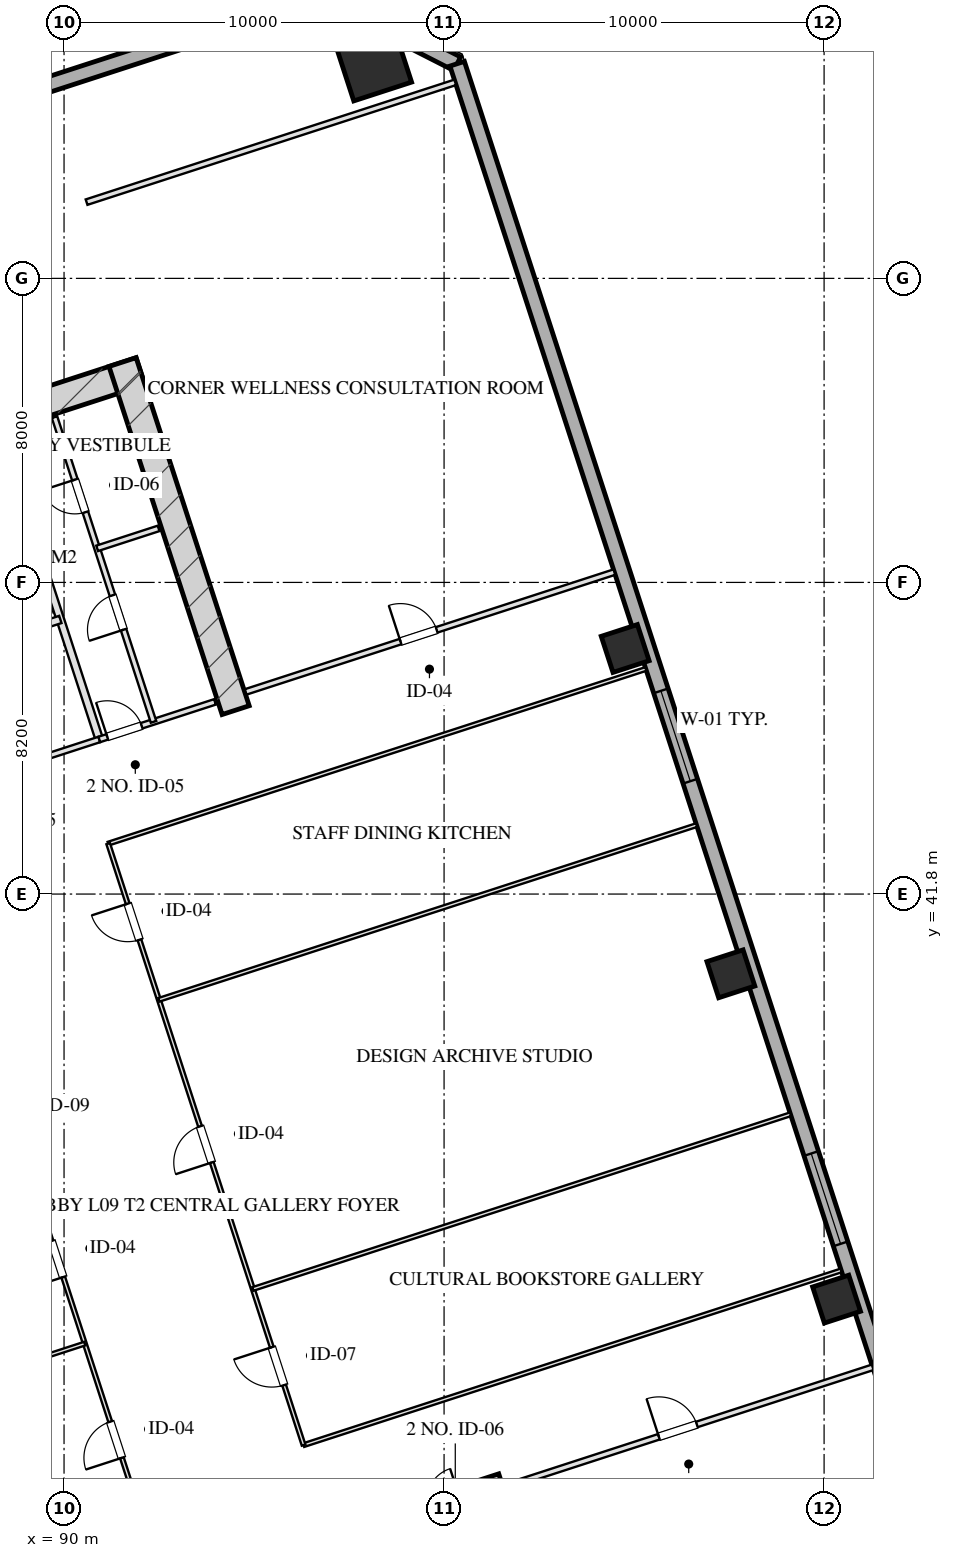
"""IFC4 building model, lengths in metres.
Left out: names, types, materials, properties, quantities, classifications, styles, units other than length and angle.
Written with IfcOpenShell. Run it as: python <this file> out.ifc"""

import sys

from ifc_helpers import new_model, si_unit, direction, frame, frame_2d, origin, origin_2d, place, context, subcontext, project, spatial, rectangle, hollow_rectangle, extrude, element, fill, save


model = new_model("IFC4")
c1 = context("Model", 3, precision=1e-05, world=origin(), true_north=direction((0.0, 1.0)))
c2 = subcontext(c1, "Body", "Model", "MODEL_VIEW")
j1 = project(units=[si_unit("LENGTHUNIT", "METRE"), si_unit("PLANEANGLEUNIT", "RADIAN")], contexts=[c1])
p1 = place(None, origin())
s1 = spatial("IfcSite", under=j1, at=p1, CompositionType="ELEMENT")
p2 = place(p1, origin())
s2 = spatial("IfcBuilding", under=s1, at=p2, CompositionType="ELEMENT")
p3 = place(p2, frame((0.0, 0.0, 42.0)))
s3 = spatial("IfcBuildingStorey", under=s2, at=p3, CompositionType="ELEMENT", Elevation=42.0)
p4 = place(p3, frame((101.082, 26.429, 0.0), z_axis=(0.0, 0.0, 1.0), x_axis=(0.309016134813, -0.951056795583, 0.0)))
e1 = element("IfcWall", 1, at=p4, inside=s3, PredefinedType="SHEAR", context=c2, shape_type="SweptSolid", body=[
    extrude(rectangle(XDim=9.63, YDim=0.75, at=frame_2d((4.815, 0.0))), origin(), (0.0, 0.0, 1.0), 4.0),
])
p5 = place(p3, frame((76.272, 50.443, 0.0), z_axis=(0.0, 0.0, 1.0), x_axis=(0.951056072937, 0.309018358888, 0.0)))
e2 = element("IfcWall", 2, at=p5, inside=s3, PredefinedType="SHEAR", context=c2, shape_type="SweptSolid", body=[
    extrude(rectangle(XDim=16.55, YDim=0.75, at=frame_2d((8.275, 0.0))), origin(), (0.0, 0.0, 1.0), 4.0),
])
p6 = place(p3, frame((94.515, 46.639, 0.0), z_axis=(0.0, 0.0, 1.0), x_axis=(-0.309016134813, 0.951056795583, 0.0)))
e3 = element("IfcWall", 3, at=p6, inside=s3, PredefinedType="SHEAR", context=c2, shape_type="SweptSolid", body=[
    extrude(rectangle(XDim=9.63, YDim=0.75, at=frame_2d((4.815, 0.0))), origin(), (0.0, 0.0, 1.0), 4.0),
])
p7 = place(p3, frame((98.137, 63.677, 0.0), z_axis=(0.0, 0.0, 1.0), x_axis=(0.951056516295, 0.309016994375, 0.0)))
e4 = element("IfcColumn", 4, at=p7, inside=s3, PredefinedType="COLUMN", context=c2, shape_type="SweptSolid", body=[
    extrude(hollow_rectangle(XDim=1.6, YDim=1.6, WallThickness=0.055, at=origin_2d()), origin(), (0.0, 0.0, 1.0), 4.001),
])
for number, where, z_axis, x_axis in (
    (5, (110.328, 31.142, 0.0), (0.0, 0.0, 1.0), (0.951, 0.309, 0.0)),
    (6, (107.547, 39.701, 0.0), (0.0, 0.0, 1.0), (0.951, 0.309, 0.0)),
    (7, (104.766, 48.261, 0.0), (0.0, 0.0, 1.0), (0.951, 0.309, 0.0)),
):
    element("IfcColumn", number, at=place(p3, frame(where, z_axis=z_axis, x_axis=x_axis)), inside=s3, PredefinedType="COLUMN", context=c2, shape_type="SweptSolid", body=[
        extrude(hollow_rectangle(XDim=1.0, YDim=1.0, WallThickness=0.036, at=origin_2d()), origin(), (0.0, 0.0, 1.0), 4.001),
    ])
p8 = place(p3, frame((66.002, 55.433, 0.0), z_axis=(0.0, 0.0, 1.0), x_axis=(0.951055939317, 0.309018770125, 0.0)))
e8 = element("IfcWall", 8, at=p8, inside=s3, PredefinedType="SOLIDWALL", context=c2, shape_type="SweptSolid", body=[
    extrude(rectangle(XDim=32.4, YDim=0.4, at=frame_2d((16.2, 0.0))), origin(), (0.0, 0.0, 1.0), 3.1),
])
p9 = place(p3, frame((96.816, 65.446, 0.0), z_axis=(0.0, 0.0, 1.0), x_axis=(0.890998089617, -0.454007053137, 0.0)))
e9 = element("IfcWall", 9, at=p9, inside=s3, PredefinedType="SOLIDWALL", context=c2, shape_type="SweptSolid", body=[
    extrude(rectangle(XDim=3.96, YDim=0.4, at=frame_2d((1.98, 0.0))), origin(), (0.0, 0.0, 1.0), 3.1),
])
p10 = place(p3, frame((100.345, 63.648, 0.0), z_axis=(0.0, 0.0, 1.0), x_axis=(0.309014526607, -0.951057318118, 0.0)))
e10 = element("IfcWall", 10, at=p10, inside=s3, PredefinedType="SOLIDWALL", context=c2, shape_type="SweptSolid", body=[
    extrude(rectangle(XDim=50.0, YDim=0.4, at=frame_2d((25.0, 0.0))), origin(), (0.0, 0.0, 1.0), 3.1),
])
p11 = place(p10, frame((30.15, 0.0, 0.75)))
e11 = element("IfcOpeningElement", 11, at=p11, cuts=e10, PredefinedType="OPENING", context=c2, shape_type="SweptSolid", body=[
    extrude(rectangle(XDim=2.5, YDim=1.75, at=frame_2d((1.25, 0.875))), frame((0.0, 0.21, 0.0), z_axis=(0.0, -1.0, 0.0), x_axis=(1.0, 0.0, 0.0)), (0.0, 0.0, 1.0), 0.42),
])
p12 = place(p10, frame((17.35, 0.0, 0.75)))
e12 = element("IfcOpeningElement", 12, at=p12, cuts=e10, PredefinedType="OPENING", context=c2, shape_type="SweptSolid", body=[
    extrude(rectangle(XDim=2.5, YDim=1.75, at=frame_2d((1.25, 0.875))), frame((0.0, 0.21, 0.0), z_axis=(0.0, -1.0, 0.0), x_axis=(1.0, 0.0, 0.0)), (0.0, 0.0, 1.0), 0.42),
])
p13 = place(p3, frame((90.928, 45.868, 0.0), z_axis=(0.0, 0.0, 1.0), x_axis=(-0.309042196757, 0.951048327176, 0.0)))
e13 = element("IfcWall", 13, at=p13, inside=s3, PredefinedType="PARTITIONING", context=c2, shape_type="SweptSolid", body=[
    extrude(rectangle(XDim=8.43, YDim=0.2, at=frame_2d((4.215, 0.0))), origin(), (0.0, 0.0, 1.0), 3.705),
])
p14 = place(p3, frame((86.743, 44.508, 0.0), z_axis=(0.0, 0.0, 1.0), x_axis=(0.951063829732, 0.308994485023, 0.0)))
e14 = element("IfcWall", 14, at=p14, inside=s3, PredefinedType="PARTITIONING", context=c2, shape_type="SweptSolid", body=[
    extrude(rectangle(XDim=4.4, YDim=0.15, at=frame_2d((2.2, 0.0))), origin(), (0.0, 0.0, 1.0), 3.705),
])
p15 = place(p14, frame((1.45, 0.0, 0.0)))
e15 = element("IfcOpeningElement", 15, at=p15, cuts=e14, PredefinedType="OPENING", context=c2, shape_type="SweptSolid", body=[
    extrude(rectangle(XDim=1.5, YDim=2.05, at=frame_2d((0.75, 1.025))), frame((0.0, 0.085, 0.0), z_axis=(0.0, -1.0, 0.0), x_axis=(1.0, 0.0, 0.0)), (0.0, 0.0, 1.0), 0.17),
])
p16 = place(p3, frame((85.718, 47.666, 0.0), z_axis=(0.0, 0.0, 1.0), x_axis=(0.951058531764, 0.30901079133, 0.0)))
e16 = element("IfcWall", 16, at=p16, inside=s3, PredefinedType="PARTITIONING", context=c2, shape_type="SweptSolid", body=[
    extrude(rectangle(XDim=4.4, YDim=0.2, at=frame_2d((2.2, 0.0))), origin(), (0.0, 0.0, 1.0), 3.705),
])
p17 = place(p16, frame((0.45, 0.0, 0.0)))
e17 = element("IfcOpeningElement", 17, at=p17, cuts=e16, PredefinedType="OPENING", context=c2, shape_type="SweptSolid", body=[
    extrude(rectangle(XDim=1.1, YDim=2.05, at=frame_2d((0.55, 1.025))), frame((0.0, 0.11, 0.0), z_axis=(0.0, -1.0, 0.0), x_axis=(1.0, 0.0, 0.0)), (0.0, 0.0, 1.0), 0.22),
])
p18 = place(p16, frame((2.55, 0.0, 0.0)))
e18 = element("IfcOpeningElement", 18, at=p18, cuts=e16, PredefinedType="OPENING", context=c2, shape_type="SweptSolid", body=[
    extrude(rectangle(XDim=1.1, YDim=2.05, at=frame_2d((0.55, 1.025))), frame((0.0, 0.11, 0.0), z_axis=(0.0, -1.0, 0.0), x_axis=(1.0, 0.0, 0.0)), (0.0, 0.0, 1.0), 0.22),
])
p19 = place(p3, frame((90.928, 45.868, 0.0), z_axis=(0.0, 0.0, 1.0), x_axis=(0.951059297078, 0.309008435874, 0.0)))
e19 = element("IfcWall", 19, at=p19, inside=s3, PredefinedType="PARTITIONING", context=c2, shape_type="SweptSolid", body=[
    extrude(rectangle(XDim=3.2, YDim=0.15, at=frame_2d((1.6, 0.0))), origin(), (0.0, 0.0, 1.0), 3.705),
])
p20 = place(p19, frame((0.22, 0.0, 0.0)))
e20 = element("IfcOpeningElement", 20, at=p20, cuts=e19, PredefinedType="OPENING", context=c2, shape_type="SweptSolid", body=[
    extrude(rectangle(XDim=0.95, YDim=2.05, at=frame_2d((0.475, 1.025))), frame((0.0, 0.085, 0.0), z_axis=(0.0, -1.0, 0.0), x_axis=(1.0, 0.0, 0.0)), (0.0, 0.0, 1.0), 0.17),
])
p21 = place(p3, frame((92.355, 46.331, 0.0), z_axis=(0.0, 0.0, 1.0), x_axis=(-0.309007490203, 0.951059604335, 0.0)))
e21 = element("IfcWall", 21, at=p21, inside=s3, PredefinedType="PARTITIONING", context=c2, shape_type="SweptSolid", body=[
    extrude(rectangle(XDim=8.43, YDim=0.15, at=frame_2d((4.215, 0.0))), origin(), (0.0, 0.0, 1.0), 3.705),
])
p22 = place(p21, frame((2.55, 0.0, 0.0)))
e22 = element("IfcOpeningElement", 22, at=p22, cuts=e21, PredefinedType="OPENING", context=c2, shape_type="SweptSolid", body=[
    extrude(rectangle(XDim=0.95, YDim=2.05, at=frame_2d((0.475, 1.025))), frame((0.0, 0.085, 0.0), z_axis=(0.0, -1.0, 0.0), x_axis=(1.0, 0.0, 0.0)), (0.0, 0.0, 1.0), 0.17),
])
p23 = place(p21, frame((5.8, 0.0, 0.0)))
e23 = element("IfcOpeningElement", 23, at=p23, cuts=e21, PredefinedType="OPENING", context=c2, shape_type="SweptSolid", body=[
    extrude(rectangle(XDim=0.9, YDim=2.05, at=frame_2d((0.45, 1.025))), frame((0.0, 0.085, 0.0), z_axis=(0.0, -1.0, 0.0), x_axis=(1.0, 0.0, 0.0)), (0.0, 0.0, 1.0), 0.17),
])
p24 = place(p3, frame((90.871, 50.896, 0.0), z_axis=(0.0, 0.0, 1.0), x_axis=(0.951054116971, 0.309024378638, 0.0)))
e24 = element("IfcWall", 24, at=p24, inside=s3, PredefinedType="PARTITIONING", context=c2, shape_type="SweptSolid", body=[
    extrude(rectangle(XDim=1.7, YDim=0.15, at=frame_2d((0.85, 0.0))), origin(), (0.0, 0.0, 1.0), 3.705),
])
p25 = place(p3, frame((101.578, 26.196, 0.0), z_axis=(0.0, 0.0, 1.0), x_axis=(0.951059043131, 0.309009217467, 0.0)))
e25 = element("IfcWall", 25, at=p25, inside=s3, PredefinedType="PARTITIONING", context=c2, shape_type="SweptSolid", body=[
    extrude(rectangle(XDim=10.2, YDim=0.15, at=frame_2d((5.1, 0.0))), origin(), (0.0, 0.0, 1.0), 3.705),
])
p26 = place(p25, frame((4.284, 0.0, 0.0)))
e26 = element("IfcOpeningElement", 26, at=p26, cuts=e25, PredefinedType="OPENING", context=c2, shape_type="SweptSolid", body=[
    extrude(rectangle(XDim=1.05, YDim=2.05, at=frame_2d((0.525, 1.025))), frame((0.0, 0.085, 0.0), z_axis=(0.0, -1.0, 0.0), x_axis=(1.0, 0.0, 0.0)), (0.0, 0.0, 1.0), 0.17),
])
p27 = place(p3, frame((90.593, 60.006, 0.0), z_axis=(0.0, 0.0, 1.0), x_axis=(0.951059043131, 0.309009217467, 0.0)))
e27 = element("IfcWall", 27, at=p27, inside=s3, PredefinedType="PARTITIONING", context=c2, shape_type="SweptSolid", body=[
    extrude(rectangle(XDim=10.2, YDim=0.15, at=frame_2d((5.1, 0.0))), origin(), (0.0, 0.0, 1.0), 3.705),
])
p28 = place(p3, frame((94.78, 47.119, 0.0), z_axis=(0.0, 0.0, 1.0), x_axis=(0.951054294345, 0.309023832749, 0.0)))
e28 = element("IfcWall", 28, at=p28, inside=s3, PredefinedType="PARTITIONING", context=c2, shape_type="SweptSolid", body=[
    extrude(rectangle(XDim=10.2, YDim=0.15, at=frame_2d((5.1, 0.0))), origin(), (0.0, 0.0, 1.0), 3.705),
])
p29 = place(p28, frame((4.284, 0.0, 0.0)))
e29 = element("IfcOpeningElement", 29, at=p29, cuts=e28, PredefinedType="OPENING", context=c2, shape_type="SweptSolid", body=[
    extrude(rectangle(XDim=1.0, YDim=2.05, at=frame_2d((0.5, 1.025))), frame((0.0, 0.085, 0.0), z_axis=(0.0, -1.0, 0.0), x_axis=(1.0, 0.0, 0.0)), (0.0, 0.0, 1.0), 0.17),
])
for number, where, z_axis, x_axis in (
    (30, (96.304, 27.3, 0.0), (0.0, 0.0, 1.0), (0.951, 0.309, 0.0)),
    (31, (91.162, 43.126, 0.0), (0.0, 0.0, 1.0), (0.951, 0.309, 0.0)),
):
    element("IfcWall", number, at=place(p3, frame(where, z_axis=z_axis, x_axis=x_axis)), inside=s3, PredefinedType="MOVABLE", context=c2, shape_type="SweptSolid", body=[
        extrude(rectangle(XDim=14.875, YDim=0.1, at=frame_2d((7.438, 0.0))), origin(), (0.0, 0.0, 1.0), 3.705),
    ])
p30 = place(p3, frame((91.882, 25.863, 0.0), z_axis=(0.0, 0.0, 1.0), x_axis=(-0.309022042254, 0.951054876125, 0.0)))
e32 = element("IfcWall", 32, at=p30, inside=s3, PredefinedType="MOVABLE", context=c2, shape_type="SweptSolid", body=[
    extrude(rectangle(XDim=16.64, YDim=0.1, at=frame_2d((8.32, 0.0))), origin(), (0.0, 0.0, 1.0), 3.705),
])
p31 = place(p30, frame((1.16, 0.0, 0.0)))
e33 = element("IfcOpeningElement", 33, at=p31, cuts=e32, PredefinedType="OPENING", context=c2, shape_type="SweptSolid", body=[
    extrude(rectangle(XDim=1.0, YDim=2.05, at=frame_2d((0.5, 1.025))), frame((0.0, 0.06, 0.0), z_axis=(0.0, -1.0, 0.0), x_axis=(1.0, 0.0, 0.0)), (0.0, 0.0, 1.0), 0.12),
])
p32 = place(p30, frame((6.16, 0.0, 0.0)))
e34 = element("IfcOpeningElement", 34, at=p32, cuts=e32, PredefinedType="OPENING", context=c2, shape_type="SweptSolid", body=[
    extrude(rectangle(XDim=1.0, YDim=2.05, at=frame_2d((0.5, 1.025))), frame((0.0, 0.06, 0.0), z_axis=(0.0, -1.0, 0.0), x_axis=(1.0, 0.0, 0.0)), (0.0, 0.0, 1.0), 0.12),
])
p33 = place(p30, frame((10.16, 0.0, 0.0)))
e35 = element("IfcOpeningElement", 35, at=p33, cuts=e32, PredefinedType="OPENING", context=c2, shape_type="SweptSolid", body=[
    extrude(rectangle(XDim=0.85, YDim=2.05, at=frame_2d((0.425, 1.025))), frame((0.0, 0.06, 0.0), z_axis=(0.0, -1.0, 0.0), x_axis=(1.0, 0.0, 0.0)), (0.0, 0.0, 1.0), 0.12),
])
p34 = place(p30, frame((14.48, 0.0, 0.0)))
e36 = element("IfcOpeningElement", 36, at=p34, cuts=e32, PredefinedType="OPENING", context=c2, shape_type="SweptSolid", body=[
    extrude(rectangle(XDim=1.0, YDim=2.05, at=frame_2d((0.5, 1.025))), frame((0.0, 0.06, 0.0), z_axis=(0.0, -1.0, 0.0), x_axis=(1.0, 0.0, 0.0)), (0.0, 0.0, 1.0), 0.12),
])
p35 = place(p3, frame((96.304, 27.3, 0.0), z_axis=(0.0, 0.0, 1.0), x_axis=(-0.30901773025, 0.951056277195, 0.0)))
e37 = element("IfcWall", 37, at=p35, inside=s3, PredefinedType="MOVABLE", context=c2, shape_type="SweptSolid", body=[
    extrude(rectangle(XDim=16.64, YDim=0.1, at=frame_2d((8.32, 0.0))), origin(), (0.0, 0.0, 1.0), 3.705),
])
p36 = place(p35, frame((1.66, 0.0, 0.0)))
e38 = element("IfcOpeningElement", 38, at=p36, cuts=e37, PredefinedType="OPENING", context=c2, shape_type="SweptSolid", body=[
    extrude(rectangle(XDim=1.05, YDim=2.05, at=frame_2d((0.525, 1.025))), frame((0.0, 0.06, 0.0), z_axis=(0.0, -1.0, 0.0), x_axis=(1.0, 0.0, 0.0)), (0.0, 0.0, 1.0), 0.12),
])
p37 = place(p35, frame((7.82, 0.0, 0.0)))
e39 = element("IfcOpeningElement", 39, at=p37, cuts=e37, PredefinedType="OPENING", context=c2, shape_type="SweptSolid", body=[
    extrude(rectangle(XDim=1.0, YDim=2.05, at=frame_2d((0.5, 1.025))), frame((0.0, 0.06, 0.0), z_axis=(0.0, -1.0, 0.0), x_axis=(1.0, 0.0, 0.0)), (0.0, 0.0, 1.0), 0.12),
])
p38 = place(p35, frame((13.98, 0.0, 0.0)))
e40 = element("IfcOpeningElement", 40, at=p38, cuts=e37, PredefinedType="OPENING", context=c2, shape_type="SweptSolid", body=[
    extrude(rectangle(XDim=1.0, YDim=2.05, at=frame_2d((0.5, 1.025))), frame((0.0, 0.06, 0.0), z_axis=(0.0, -1.0, 0.0), x_axis=(1.0, 0.0, 0.0)), (0.0, 0.0, 1.0), 0.12),
])
p39 = place(p3, frame((73.356, 24.386, 0.0), z_axis=(0.0, 0.0, 1.0), x_axis=(0.951057491432, 0.309013993197, 0.0)))
e41 = element("IfcWall", 41, at=p39, inside=s3, PredefinedType="MOVABLE", context=c2, shape_type="SweptSolid", body=[
    extrude(rectangle(XDim=18.075, YDim=0.1, at=frame_2d((9.038, 0.0))), origin(), (0.0, 0.0, 1.0), 3.705),
])
for number, where, z_axis, x_axis in (
    (42, (94.969, 31.409, 0.0), (0.0, 0.0, 1.0), (0.951, 0.309, 0.0)),
    (43, (92.497, 39.017, 0.0), (0.0, 0.0, 1.0), (0.951, 0.309, 0.0)),
):
    element("IfcWall", number, at=place(p3, frame(where, z_axis=z_axis, x_axis=x_axis)), inside=s3, PredefinedType="MOVABLE", context=c2, shape_type="SweptSolid", body=[
        extrude(rectangle(XDim=14.875, YDim=0.1, at=frame_2d((7.438, 0.0))), origin(), (0.0, 0.0, 1.0), 3.705),
    ])
p40 = place(p11, origin())
e44 = element("IfcWindow", 44, at=p40, inside=s3, PartitioningType="TRIPLE_PANEL_VERTICAL", PredefinedType="WINDOW", context=c2, shape_type="SweptSolid", body=[
    extrude(rectangle(XDim=2.5, YDim=1.75, at=frame_2d((1.25, 0.875))), frame((0.0, 0.03, 0.0), z_axis=(0.0, -1.0, 0.0), x_axis=(1.0, 0.0, 0.0)), (0.0, 0.0, 1.0), 0.06),
])
fill(e11, e44)
p41 = place(p12, origin())
e45 = element("IfcWindow", 45, at=p41, inside=s3, PartitioningType="TRIPLE_PANEL_VERTICAL", PredefinedType="WINDOW", context=c2, shape_type="SweptSolid", body=[
    extrude(rectangle(XDim=2.5, YDim=1.75, at=frame_2d((1.25, 0.875))), frame((0.0, 0.03, 0.0), z_axis=(0.0, -1.0, 0.0), x_axis=(1.0, 0.0, 0.0)), (0.0, 0.0, 1.0), 0.06),
])
fill(e12, e45)
p42 = place(p20, origin())
e46 = element("IfcDoor", 46, at=p42, inside=s3, OperationType="SINGLE_SWING_LEFT", PredefinedType="DOOR", context=c2, shape_type="SweptSolid", body=[
    extrude(rectangle(XDim=0.95, YDim=2.05, at=frame_2d((0.475, 1.025))), frame((0.0, 0.025, 0.0), z_axis=(0.0, -1.0, 0.0), x_axis=(1.0, 0.0, 0.0)), (0.0, 0.0, 1.0), 0.05),
])
fill(e20, e46)
p43 = place(p22, origin())
e47 = element("IfcDoor", 47, at=p43, inside=s3, OperationType="SINGLE_SWING_LEFT", PredefinedType="DOOR", context=c2, shape_type="SweptSolid", body=[
    extrude(rectangle(XDim=0.95, YDim=2.05, at=frame_2d((0.475, 1.025))), frame((0.0, 0.025, 0.0), z_axis=(0.0, -1.0, 0.0), x_axis=(1.0, 0.0, 0.0)), (0.0, 0.0, 1.0), 0.05),
])
fill(e22, e47)
p44 = place(p23, origin())
e48 = element("IfcDoor", 48, at=p44, inside=s3, OperationType="SINGLE_SWING_RIGHT", PredefinedType="DOOR", context=c2, shape_type="SweptSolid", body=[
    extrude(rectangle(XDim=0.9, YDim=2.05, at=frame_2d((0.45, 1.025))), frame((0.0, 0.025, 0.0), z_axis=(0.0, -1.0, 0.0), x_axis=(1.0, 0.0, 0.0)), (0.0, 0.0, 1.0), 0.05),
])
fill(e23, e48)
p45 = place(p26, origin())
e49 = element("IfcDoor", 49, at=p45, inside=s3, OperationType="SINGLE_SWING_LEFT", PredefinedType="DOOR", context=c2, shape_type="SweptSolid", body=[
    extrude(rectangle(XDim=1.05, YDim=2.05, at=frame_2d((0.525, 1.025))), frame((0.0, 0.025, 0.0), z_axis=(0.0, -1.0, 0.0), x_axis=(1.0, 0.0, 0.0)), (0.0, 0.0, 1.0), 0.05),
])
fill(e26, e49)
p46 = place(p29, origin())
e50 = element("IfcDoor", 50, at=p46, inside=s3, OperationType="SINGLE_SWING_LEFT", PredefinedType="DOOR", context=c2, shape_type="SweptSolid", body=[
    extrude(rectangle(XDim=1.0, YDim=2.05, at=frame_2d((0.5, 1.025))), frame((0.0, 0.025, 0.0), z_axis=(0.0, -1.0, 0.0), x_axis=(1.0, 0.0, 0.0)), (0.0, 0.0, 1.0), 0.05),
])
fill(e29, e50)
p47 = place(p31, origin())
e51 = element("IfcDoor", 51, at=p47, inside=s3, OperationType="SINGLE_SWING_LEFT", PredefinedType="DOOR", context=c2, shape_type="SweptSolid", body=[
    extrude(rectangle(XDim=1.0, YDim=2.05, at=frame_2d((0.5, 1.025))), frame((0.0, 0.025, 0.0), z_axis=(0.0, -1.0, 0.0), x_axis=(1.0, 0.0, 0.0)), (0.0, 0.0, 1.0), 0.05),
])
fill(e33, e51)
p48 = place(p32, origin())
e52 = element("IfcDoor", 52, at=p48, inside=s3, OperationType="SINGLE_SWING_LEFT", PredefinedType="DOOR", context=c2, shape_type="SweptSolid", body=[
    extrude(rectangle(XDim=1.0, YDim=2.05, at=frame_2d((0.5, 1.025))), frame((0.0, 0.025, 0.0), z_axis=(0.0, -1.0, 0.0), x_axis=(1.0, 0.0, 0.0)), (0.0, 0.0, 1.0), 0.05),
])
fill(e34, e52)
p49 = place(p36, origin())
e53 = element("IfcDoor", 53, at=p49, inside=s3, OperationType="SINGLE_SWING_RIGHT", PredefinedType="DOOR", context=c2, shape_type="SweptSolid", body=[
    extrude(rectangle(XDim=1.05, YDim=2.05, at=frame_2d((0.525, 1.025))), frame((0.0, 0.025, 0.0), z_axis=(0.0, -1.0, 0.0), x_axis=(1.0, 0.0, 0.0)), (0.0, 0.0, 1.0), 0.05),
])
fill(e38, e53)
p50 = place(p37, origin())
e54 = element("IfcDoor", 54, at=p50, inside=s3, OperationType="SINGLE_SWING_LEFT", PredefinedType="DOOR", context=c2, shape_type="SweptSolid", body=[
    extrude(rectangle(XDim=1.0, YDim=2.05, at=frame_2d((0.5, 1.025))), frame((0.0, 0.025, 0.0), z_axis=(0.0, -1.0, 0.0), x_axis=(1.0, 0.0, 0.0)), (0.0, 0.0, 1.0), 0.05),
])
fill(e39, e54)
p51 = place(p38, origin())
e55 = element("IfcDoor", 55, at=p51, inside=s3, OperationType="SINGLE_SWING_RIGHT", PredefinedType="DOOR", context=c2, shape_type="SweptSolid", body=[
    extrude(rectangle(XDim=1.0, YDim=2.05, at=frame_2d((0.5, 1.025))), frame((0.0, 0.025, 0.0), z_axis=(0.0, -1.0, 0.0), x_axis=(1.0, 0.0, 0.0)), (0.0, 0.0, 1.0), 0.05),
])
fill(e40, e55)
save(model, sys.argv[1])
